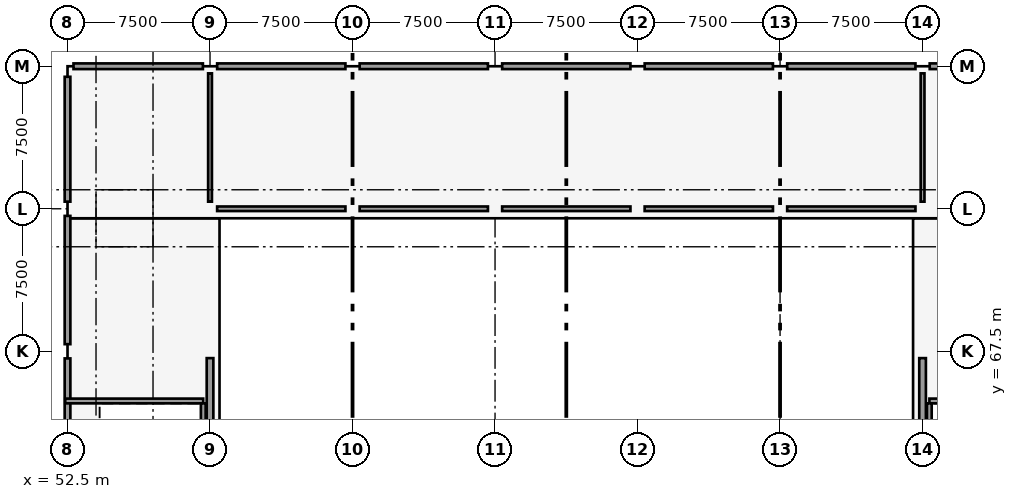
"""IFC4 building model, lengths in metres.
Left out: names, types, materials, properties, quantities, classifications, styles, units other than length and angle.
Written with IfcOpenShell. Run it as: python <this file> out.ifc"""

import sys

from ifc_helpers import new_model, si_unit, direction, frame, frame_2d, origin, origin_2d, place, context, subcontext, project, spatial, rectangle, extrude, element, fill, save


model = new_model("IFC4")
c1 = context("Model", 3, precision=1e-05, world=origin(), true_north=direction((0.0, 1.0)))
c2 = subcontext(c1, "Body", "Model", "MODEL_VIEW")
j1 = project(units=[si_unit("LENGTHUNIT", "METRE"), si_unit("PLANEANGLEUNIT", "RADIAN")], contexts=[c1])
p1 = place(None, origin())
s1 = spatial("IfcSite", under=j1, at=p1, CompositionType="ELEMENT")
p2 = place(p1, origin())
s2 = spatial("IfcBuilding", under=s1, at=p2, CompositionType="ELEMENT")
p3 = place(p2, frame((0.0, 0.0, 13.2)))
s3 = spatial("IfcBuildingStorey", under=s2, at=p3, CompositionType="ELEMENT", Elevation=13.2)
for number, where, z_axis, x_axis in (
    (1, (52.5, 67.5, 0.0), (0.0, 0.0, 1.0), (1.0, 0.0, 0.0)),
    (2, (52.5, 75.0, 0.0), (0.0, 0.0, 1.0), (1.0, 0.0, 0.0)),
):
    element("IfcColumn", number, at=place(p3, frame(where, z_axis=z_axis, x_axis=x_axis)), inside=s3, PredefinedType="COLUMN", context=c2, shape_type="SweptSolid", body=[
        extrude(rectangle(XDim=0.72, YDim=0.72, at=origin_2d()), origin(), (0.0, 0.0, 1.0), 3.9),
    ])
p4 = place(p3, frame((52.5, 82.5, 0.0), z_axis=(0.0, 0.0, 1.0), x_axis=(1.0, 0.0, 0.0)))
e3 = element("IfcColumn", 3, at=p4, inside=s3, PredefinedType="COLUMN", context=c2, shape_type="SweptSolid", body=[
    extrude(rectangle(XDim=0.6, YDim=1.1, at=origin_2d()), origin(), (0.0, 0.0, 1.0), 3.9),
])
for number, where, z_axis, x_axis in (
    (4, (60.0, 67.5, 0.0), (0.0, 0.0, 1.0), (1.0, 0.0, 0.0)),
    (5, (60.0, 75.0, 0.0), (0.0, 0.0, 1.0), (1.0, 0.0, 0.0)),
    (6, (60.0, 82.5, 0.0), (0.0, 0.0, 1.0), (1.0, 0.0, 0.0)),
    (7, (67.5, 75.0, 0.0), (0.0, 0.0, 1.0), (1.0, 0.0, 0.0)),
    (8, (67.5, 82.5, 0.0), (0.0, 0.0, 1.0), (1.0, 0.0, 0.0)),
    (9, (75.0, 75.0, 0.0), (0.0, 0.0, 1.0), (1.0, 0.0, 0.0)),
    (10, (75.0, 82.5, 0.0), (0.0, 0.0, 1.0), (1.0, 0.0, 0.0)),
    (11, (82.5, 75.0, 0.0), (0.0, 0.0, 1.0), (1.0, 0.0, 0.0)),
    (12, (82.5, 82.5, 0.0), (0.0, 0.0, 1.0), (1.0, 0.0, 0.0)),
    (13, (90.0, 75.0, 0.0), (0.0, 0.0, 1.0), (1.0, 0.0, 0.0)),
    (14, (90.0, 82.5, 0.0), (0.0, 0.0, 1.0), (1.0, 0.0, 0.0)),
    (15, (97.5, 67.5, 0.0), (0.0, 0.0, 1.0), (1.0, 0.0, 0.0)),
    (16, (97.5, 75.0, 0.0), (0.0, 0.0, 1.0), (1.0, 0.0, 0.0)),
    (17, (97.5, 82.5, 0.0), (0.0, 0.0, 1.0), (1.0, 0.0, 0.0)),
):
    element("IfcColumn", number, at=place(p3, frame(where, z_axis=z_axis, x_axis=x_axis)), inside=s3, PredefinedType="COLUMN", context=c2, shape_type="SweptSolid", body=[
        extrude(rectangle(XDim=0.72, YDim=0.72, at=origin_2d()), origin(), (0.0, 0.0, 1.0), 3.9),
    ])
p5 = place(p3, frame((60.0, 60.36, 0.0), z_axis=(0.0, 0.0, 1.0), x_axis=(0.0, 1.0, 0.0)))
e18 = element("IfcWall", 18, at=p5, inside=s3, PredefinedType="SHEAR", context=c2, shape_type="SweptSolid", body=[
    extrude(rectangle(XDim=6.78, YDim=0.35, at=frame_2d((3.39, 0.0))), origin(), (0.0, 0.0, 1.0), 2.57),
])
p6 = place(p3, frame((97.5, 60.36, 0.0), z_axis=(0.0, 0.0, 1.0), x_axis=(0.0, 1.0, 0.0)))
e19 = element("IfcWall", 19, at=p6, inside=s3, PredefinedType="SHEAR", context=c2, shape_type="SweptSolid", body=[
    extrude(rectangle(XDim=6.78, YDim=0.35, at=frame_2d((3.39, 0.0))), origin(), (0.0, 0.0, 1.0), 2.67),
])
for number, where, z_axis, x_axis in (
    (20, (52.5, 60.375, 0.0), (0.0, 0.0, 1.0), (0.0, 1.0, 0.0)),
    (21, (52.5, 67.875, 0.0), (0.0, 0.0, 1.0), (0.0, 1.0, 0.0)),
):
    element("IfcWall", number, at=place(p3, frame(where, z_axis=z_axis, x_axis=x_axis)), inside=s3, PredefinedType="SOLIDWALL", context=c2, shape_type="SweptSolid", body=[
        extrude(rectangle(XDim=6.75, YDim=0.3, at=frame_2d((3.375, 0.0))), origin(), (0.0, 0.0, 1.0), 2.54),
    ])
p7 = place(p3, frame((52.5, 75.375, 0.0), z_axis=(0.0, 0.0, 1.0), x_axis=(0.0, 1.0, 0.0)))
e22 = element("IfcWall", 22, at=p7, inside=s3, PredefinedType="SOLIDWALL", context=c2, shape_type="SweptSolid", body=[
    extrude(rectangle(XDim=6.57, YDim=0.3, at=frame_2d((3.285, 0.0))), origin(), (0.0, 0.0, 1.0), 2.79),
])
p8 = place(p7, frame((1.21, 0.0, 0.6)))
e23 = element("IfcOpeningElement", 23, at=p8, cuts=e22, PredefinedType="OPENING", context=c2, shape_type="SweptSolid", body=[
    extrude(rectangle(XDim=1.2, YDim=1.2, at=frame_2d((0.6, 0.6))), frame((0.0, 0.16, 0.0), z_axis=(0.0, -1.0, 0.0), x_axis=(1.0, 0.0, 0.0)), (0.0, 0.0, 1.0), 0.32),
])
p9 = place(p3, frame((52.815, 82.5, 0.0), z_axis=(0.0, 0.0, 1.0), x_axis=(1.0, 0.0, 0.0)))
e24 = element("IfcWall", 24, at=p9, inside=s3, PredefinedType="SOLIDWALL", context=c2, shape_type="SweptSolid", body=[
    extrude(rectangle(XDim=6.81, YDim=0.3, at=frame_2d((3.405, 0.0))), origin(), (0.0, 0.0, 1.0), 2.84),
])
p10 = place(p9, frame((2.56, 0.0, 0.6)))
e25 = element("IfcOpeningElement", 25, at=p10, cuts=e24, PredefinedType="OPENING", context=c2, shape_type="SweptSolid", body=[
    extrude(rectangle(XDim=1.75, YDim=1.3, at=frame_2d((0.875, 0.65))), frame((0.0, 0.16, 0.0), z_axis=(0.0, -1.0, 0.0), x_axis=(1.0, 0.0, 0.0)), (0.0, 0.0, 1.0), 0.32),
])
p11 = place(p3, frame((60.375, 82.5, 0.0), z_axis=(0.0, 0.0, 1.0), x_axis=(1.0, 0.0, 0.0)))
e26 = element("IfcWall", 26, at=p11, inside=s3, PredefinedType="SOLIDWALL", context=c2, shape_type="SweptSolid", body=[
    extrude(rectangle(XDim=6.75, YDim=0.3, at=frame_2d((3.375, 0.0))), origin(), (0.0, 0.0, 1.0), 2.84),
])
p12 = place(p11, frame((2.4, 0.0, 0.6)))
e27 = element("IfcOpeningElement", 27, at=p12, cuts=e26, PredefinedType="OPENING", context=c2, shape_type="SweptSolid", body=[
    extrude(rectangle(XDim=1.95, YDim=1.3, at=frame_2d((0.975, 0.65))), frame((0.0, 0.16, 0.0), z_axis=(0.0, -1.0, 0.0), x_axis=(1.0, 0.0, 0.0)), (0.0, 0.0, 1.0), 0.32),
])
p13 = place(p3, frame((67.875, 82.5, 0.0), z_axis=(0.0, 0.0, 1.0), x_axis=(1.0, 0.0, 0.0)))
e28 = element("IfcWall", 28, at=p13, inside=s3, PredefinedType="SOLIDWALL", context=c2, shape_type="SweptSolid", body=[
    extrude(rectangle(XDim=6.75, YDim=0.3, at=frame_2d((3.375, 0.0))), origin(), (0.0, 0.0, 1.0), 2.84),
])
p14 = place(p3, frame((75.375, 82.5, 0.0), z_axis=(0.0, 0.0, 1.0), x_axis=(1.0, 0.0, 0.0)))
e29 = element("IfcWall", 29, at=p14, inside=s3, PredefinedType="SOLIDWALL", context=c2, shape_type="SweptSolid", body=[
    extrude(rectangle(XDim=6.75, YDim=0.3, at=frame_2d((3.375, 0.0))), origin(), (0.0, 0.0, 1.0), 2.84),
])
p15 = place(p14, frame((2.225, 0.0, 0.6)))
e30 = element("IfcOpeningElement", 30, at=p15, cuts=e29, PredefinedType="OPENING", context=c2, shape_type="SweptSolid", body=[
    extrude(rectangle(XDim=2.3, YDim=1.3, at=frame_2d((1.15, 0.65))), frame((0.0, 0.16, 0.0), z_axis=(0.0, -1.0, 0.0), x_axis=(1.0, 0.0, 0.0)), (0.0, 0.0, 1.0), 0.32),
])
p16 = place(p3, frame((82.875, 82.5, 0.0), z_axis=(0.0, 0.0, 1.0), x_axis=(1.0, 0.0, 0.0)))
e31 = element("IfcWall", 31, at=p16, inside=s3, PredefinedType="SOLIDWALL", context=c2, shape_type="SweptSolid", body=[
    extrude(rectangle(XDim=6.75, YDim=0.3, at=frame_2d((3.375, 0.0))), origin(), (0.0, 0.0, 1.0), 2.84),
])
p17 = place(p3, frame((90.375, 82.5, 0.0), z_axis=(0.0, 0.0, 1.0), x_axis=(1.0, 0.0, 0.0)))
e32 = element("IfcWall", 32, at=p17, inside=s3, PredefinedType="SOLIDWALL", context=c2, shape_type="SweptSolid", body=[
    extrude(rectangle(XDim=6.75, YDim=0.3, at=frame_2d((3.375, 0.0))), origin(), (0.0, 0.0, 1.0), 2.84),
])
p18 = place(p17, frame((2.625, 0.0, 0.6)))
e33 = element("IfcOpeningElement", 33, at=p18, cuts=e32, PredefinedType="OPENING", context=c2, shape_type="SweptSolid", body=[
    extrude(rectangle(XDim=1.5, YDim=1.2, at=frame_2d((0.75, 0.6))), frame((0.0, 0.16, 0.0), z_axis=(0.0, -1.0, 0.0), x_axis=(1.0, 0.0, 0.0)), (0.0, 0.0, 1.0), 0.32),
])
p19 = place(p3, frame((97.875, 82.5, 0.0), z_axis=(0.0, 0.0, 1.0), x_axis=(1.0, 0.0, 0.0)))
e34 = element("IfcWall", 34, at=p19, inside=s3, PredefinedType="SOLIDWALL", context=c2, shape_type="SweptSolid", body=[
    extrude(rectangle(XDim=6.82, YDim=0.3, at=frame_2d((3.41, 0.0))), origin(), (0.0, 0.0, 1.0), 2.84),
])
p20 = place(p19, frame((2.475, 0.0, 0.6)))
e35 = element("IfcOpeningElement", 35, at=p20, cuts=e34, PredefinedType="OPENING", context=c2, shape_type="SweptSolid", body=[
    extrude(rectangle(XDim=1.8, YDim=1.2, at=frame_2d((0.9, 0.6))), frame((0.0, 0.16, 0.0), z_axis=(0.0, -1.0, 0.0), x_axis=(1.0, 0.0, 0.0)), (0.0, 0.0, 1.0), 0.32),
])
p21 = place(p3, frame((52.38, 64.885, 0.0), z_axis=(0.0, 0.0, 1.0), x_axis=(1.0, 0.0, 0.0)))
e36 = element("IfcWall", 36, at=p21, inside=s3, PredefinedType="SOLIDWALL", context=c2, shape_type="SweptSolid", body=[
    extrude(rectangle(XDim=7.26, YDim=0.25, at=frame_2d((3.63, 0.0))), origin(), (0.0, 0.0, 1.0), 3.62),
])
p22 = place(p21, frame((0.62, 0.0, 0.0)))
e37 = element("IfcOpeningElement", 37, at=p22, cuts=e36, PredefinedType="OPENING", context=c2, shape_type="SweptSolid", body=[
    extrude(rectangle(XDim=1.1, YDim=2.15, at=frame_2d((0.55, 1.075))), frame((0.0, 0.135, 0.0), z_axis=(0.0, -1.0, 0.0), x_axis=(1.0, 0.0, 0.0)), (0.0, 0.0, 1.0), 0.27),
])
p23 = place(p3, frame((59.645, 61.2, 0.0), z_axis=(0.0, 0.0, 1.0), x_axis=(0.0, 1.0, 0.0)))
e38 = element("IfcWall", 38, at=p23, inside=s3, PredefinedType="SOLIDWALL", context=c2, shape_type="SweptSolid", body=[
    extrude(rectangle(XDim=3.56, YDim=0.25, at=frame_2d((1.78, 0.0))), origin(), (0.0, 0.0, 1.0), 3.62),
])
p24 = place(p3, frame((97.86, 64.885, 0.0), z_axis=(0.0, 0.0, 1.0), x_axis=(1.0, 0.0, 0.0)))
e39 = element("IfcWall", 39, at=p24, inside=s3, PredefinedType="SOLIDWALL", context=c2, shape_type="SweptSolid", body=[
    extrude(rectangle(XDim=7.26, YDim=0.25, at=frame_2d((3.63, 0.0))), origin(), (0.0, 0.0, 1.0), 3.62),
])
p25 = place(p24, frame((5.54, 0.0, 0.0)))
e40 = element("IfcOpeningElement", 40, at=p25, cuts=e39, PredefinedType="OPENING", context=c2, shape_type="SweptSolid", body=[
    extrude(rectangle(XDim=1.1, YDim=2.15, at=frame_2d((0.55, 1.075))), frame((0.0, 0.135, 0.0), z_axis=(0.0, -1.0, 0.0), x_axis=(1.0, 0.0, 0.0)), (0.0, 0.0, 1.0), 0.27),
])
p26 = place(p3, frame((97.855, 61.2, 0.0), z_axis=(0.0, 0.0, 1.0), x_axis=(0.0, 1.0, 0.0)))
e41 = element("IfcWall", 41, at=p26, inside=s3, PredefinedType="SOLIDWALL", context=c2, shape_type="SweptSolid", body=[
    extrude(rectangle(XDim=3.56, YDim=0.25, at=frame_2d((1.78, 0.0))), origin(), (0.0, 0.0, 1.0), 3.62),
])
for number, where, z_axis, x_axis in (
    (42, (60.374, 75.0, 0.0), (0.0, 0.0, 1.0), (1.0, 0.0, 0.0)),
    (43, (67.874, 75.0, 0.0), (0.0, 0.0, 1.0), (1.0, 0.0, 0.0)),
    (44, (75.374, 75.0, 0.0), (0.0, 0.0, 1.0), (1.0, 0.0, 0.0)),
):
    element("IfcWall", number, at=place(p3, frame(where, z_axis=z_axis, x_axis=x_axis)), inside=s3, PredefinedType="PARTITIONING", context=c2, shape_type="SweptSolid", body=[
        extrude(rectangle(XDim=6.752, YDim=0.24, at=frame_2d((3.376, 0.0))), origin(), (0.0, 0.0, 1.0), 2.64),
    ])
for number, where, z_axis, x_axis in (
    (45, (82.874, 75.0, 0.0), (0.0, 0.0, 1.0), (1.0, 0.0, 0.0)),
    (46, (90.374, 75.0, 0.0), (0.0, 0.0, 1.0), (1.0, 0.0, 0.0)),
):
    element("IfcWall", number, at=place(p3, frame(where, z_axis=z_axis, x_axis=x_axis)), inside=s3, PredefinedType="PARTITIONING", context=c2, shape_type="SweptSolid", body=[
        extrude(rectangle(XDim=6.752, YDim=0.24, at=frame_2d((3.376, 0.0))), origin(), (0.0, 0.0, 1.0), 2.54),
    ])
p27 = place(p3, frame((60.0, 75.374, 0.0), z_axis=(0.0, 0.0, 1.0), x_axis=(0.0, 1.0, 0.0)))
e47 = element("IfcWall", 47, at=p27, inside=s3, PredefinedType="PARTITIONING", context=c2, shape_type="SweptSolid", body=[
    extrude(rectangle(XDim=6.752, YDim=0.2, at=frame_2d((3.376, 0.0))), origin(), (0.0, 0.0, 1.0), 2.69),
])
p28 = place(p27, frame((2.576, 0.0, 0.0)))
e48 = element("IfcOpeningElement", 48, at=p28, cuts=e47, PredefinedType="OPENING", context=c2, shape_type="SweptSolid", body=[
    extrude(rectangle(XDim=1.6, YDim=2.15, at=frame_2d((0.8, 1.075))), frame((0.0, 0.11, 0.0), z_axis=(0.0, -1.0, 0.0), x_axis=(1.0, 0.0, 0.0)), (0.0, 0.0, 1.0), 0.22),
])
p29 = place(p3, frame((97.5, 75.374, 0.0), z_axis=(0.0, 0.0, 1.0), x_axis=(0.0, 1.0, 0.0)))
e49 = element("IfcWall", 49, at=p29, inside=s3, PredefinedType="PARTITIONING", context=c2, shape_type="SweptSolid", body=[
    extrude(rectangle(XDim=6.752, YDim=0.2, at=frame_2d((3.376, 0.0))), origin(), (0.0, 0.0, 1.0), 2.54),
])
p30 = place(p29, frame((2.576, 0.0, 0.0)))
e50 = element("IfcOpeningElement", 50, at=p30, cuts=e49, PredefinedType="OPENING", context=c2, shape_type="SweptSolid", body=[
    extrude(rectangle(XDim=1.6, YDim=2.15, at=frame_2d((0.8, 1.075))), frame((0.0, 0.11, 0.0), z_axis=(0.0, -1.0, 0.0), x_axis=(1.0, 0.0, 0.0)), (0.0, 0.0, 1.0), 0.22),
])
p31 = place(p8, origin())
e51 = element("IfcWindow", 51, at=p31, inside=s3, PartitioningType="SINGLE_PANEL", PredefinedType="WINDOW", context=c2, shape_type="SweptSolid", body=[
    extrude(rectangle(XDim=1.2, YDim=1.2, at=frame_2d((0.6, 0.6))), frame((0.0, 0.03, 0.0), z_axis=(0.0, -1.0, 0.0), x_axis=(1.0, 0.0, 0.0)), (0.0, 0.0, 1.0), 0.06),
])
fill(e23, e51)
p32 = place(p10, origin())
e52 = element("IfcWindow", 52, at=p32, inside=s3, PartitioningType="SINGLE_PANEL", PredefinedType="WINDOW", context=c2, shape_type="SweptSolid", body=[
    extrude(rectangle(XDim=1.75, YDim=1.3, at=frame_2d((0.875, 0.65))), frame((0.0, 0.03, 0.0), z_axis=(0.0, -1.0, 0.0), x_axis=(1.0, 0.0, 0.0)), (0.0, 0.0, 1.0), 0.06),
])
fill(e25, e52)
p33 = place(p12, origin())
e53 = element("IfcWindow", 53, at=p33, inside=s3, PartitioningType="SINGLE_PANEL", PredefinedType="WINDOW", context=c2, shape_type="SweptSolid", body=[
    extrude(rectangle(XDim=1.95, YDim=1.3, at=frame_2d((0.975, 0.65))), frame((0.0, 0.03, 0.0), z_axis=(0.0, -1.0, 0.0), x_axis=(1.0, 0.0, 0.0)), (0.0, 0.0, 1.0), 0.06),
])
fill(e27, e53)
p34 = place(p15, origin())
e54 = element("IfcWindow", 54, at=p34, inside=s3, PartitioningType="SINGLE_PANEL", PredefinedType="WINDOW", context=c2, shape_type="SweptSolid", body=[
    extrude(rectangle(XDim=2.3, YDim=1.3, at=frame_2d((1.15, 0.65))), frame((0.0, 0.03, 0.0), z_axis=(0.0, -1.0, 0.0), x_axis=(1.0, 0.0, 0.0)), (0.0, 0.0, 1.0), 0.06),
])
fill(e30, e54)
p35 = place(p18, origin())
e55 = element("IfcWindow", 55, at=p35, inside=s3, PartitioningType="SINGLE_PANEL", PredefinedType="WINDOW", context=c2, shape_type="SweptSolid", body=[
    extrude(rectangle(XDim=1.5, YDim=1.2, at=frame_2d((0.75, 0.6))), frame((0.0, 0.03, 0.0), z_axis=(0.0, -1.0, 0.0), x_axis=(1.0, 0.0, 0.0)), (0.0, 0.0, 1.0), 0.06),
])
fill(e33, e55)
p36 = place(p22, frame((1.1, 0.0, 0.0), z_axis=(0.0, 0.0, 1.0), x_axis=(-1.0, 0.0, 0.0)))
e56 = element("IfcDoor", 56, at=p36, inside=s3, OperationType="SINGLE_SWING_RIGHT", PredefinedType="DOOR", context=c2, shape_type="SweptSolid", body=[
    extrude(rectangle(XDim=1.1, YDim=2.15, at=frame_2d((0.55, 1.075))), frame((0.0, 0.025, 0.0), z_axis=(0.0, -1.0, 0.0), x_axis=(1.0, 0.0, 0.0)), (0.0, 0.0, 1.0), 0.05),
])
fill(e37, e56)
p37 = place(p28, origin())
e57 = element("IfcDoor", 57, at=p37, inside=s3, OperationType="SINGLE_SWING_RIGHT", PredefinedType="DOOR", context=c2, shape_type="SweptSolid", body=[
    extrude(rectangle(XDim=1.6, YDim=2.15, at=frame_2d((0.8, 1.075))), frame((0.0, 0.025, 0.0), z_axis=(0.0, -1.0, 0.0), x_axis=(1.0, 0.0, 0.0)), (0.0, 0.0, 1.0), 0.05),
])
fill(e48, e57)
p38 = place(p30, origin())
e58 = element("IfcDoor", 58, at=p38, inside=s3, OperationType="SINGLE_SWING_LEFT", PredefinedType="DOOR", context=c2, shape_type="SweptSolid", body=[
    extrude(rectangle(XDim=1.6, YDim=2.15, at=frame_2d((0.8, 1.075))), frame((0.0, 0.025, 0.0), z_axis=(0.0, -1.0, 0.0), x_axis=(1.0, 0.0, 0.0)), (0.0, 0.0, 1.0), 0.05),
])
fill(e50, e58)
save(model, sys.argv[1])
